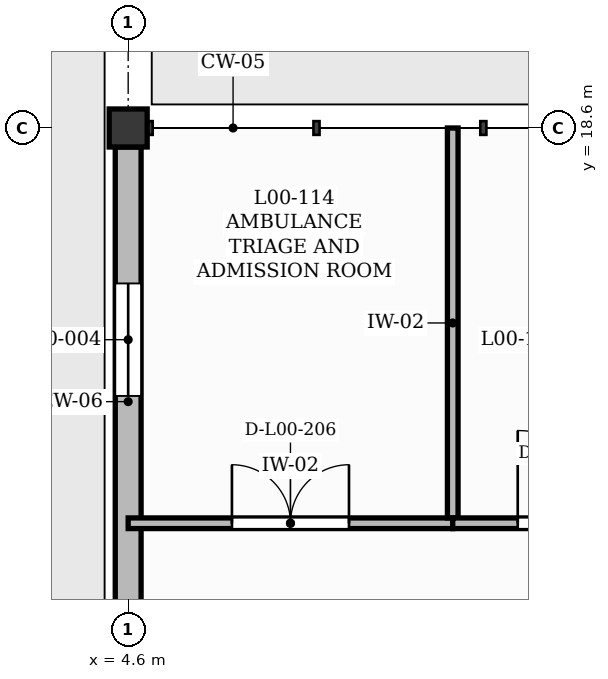
"""IFC4 building model, lengths in metres.
Left out: names, types, materials, properties, quantities, classifications, styles, units other than length and angle.
Written with IfcOpenShell. Run it as: python <this file> out.ifc"""

import sys

from ifc_helpers import new_model, si_unit, direction, frame, frame_2d, origin, origin_2d, place, context, subcontext, project, spatial, rectangle, extrude, element, fill, save


model = new_model("IFC4")
c1 = context("Model", 3, precision=1e-05, world=origin(), true_north=direction((0.0, 1.0)))
c2 = subcontext(c1, "Body", "Model", "MODEL_VIEW")
j1 = project(units=[si_unit("LENGTHUNIT", "METRE"), si_unit("PLANEANGLEUNIT", "RADIAN")], contexts=[c1])
p1 = place(None, origin())
s1 = spatial("IfcSite", under=j1, at=p1, CompositionType="ELEMENT")
p2 = place(p1, origin())
s2 = spatial("IfcBuilding", under=s1, at=p2, CompositionType="ELEMENT")
p3 = place(p2, origin())
s3 = spatial("IfcBuildingStorey", under=s2, at=p3, CompositionType="ELEMENT", Elevation=0.0)
p4 = place(p3, frame((4.6, 18.6, 0.0), z_axis=(0.0, 0.0, 1.0), x_axis=(1.0, 0.0, 0.0)))
e1 = element("IfcColumn", 1, at=p4, inside=s3, PredefinedType="COLUMN", context=c2, shape_type="SweptSolid", body=[
    extrude(rectangle(XDim=0.5, YDim=0.5, at=origin_2d()), origin(), (0.0, 0.0, 1.0), 4.2),
])
p5 = place(p3, frame((4.6, 11.65, 0.0), z_axis=(0.0, 0.0, 1.0), x_axis=(0.0, 1.0, 0.0)))
e2 = element("IfcWall", 2, at=p5, inside=s3, PredefinedType="SOLIDWALL", context=c2, shape_type="SweptSolid", body=[
    extrude(rectangle(XDim=6.7, YDim=0.34, at=frame_2d((3.35, 0.0))), origin(), (0.0, 0.0, 1.0), 3.68),
])
p6 = place(p5, frame((3.425, 0.0, 1.0)))
e3 = element("IfcOpeningElement", 3, at=p6, cuts=e2, PredefinedType="OPENING", context=c2, shape_type="SweptSolid", body=[
    extrude(rectangle(XDim=1.48, YDim=2.2, at=frame_2d((0.74, 1.1))), frame((0.0, 0.18, 0.0), z_axis=(0.0, -1.0, 0.0), x_axis=(1.0, 0.0, 0.0)), (0.0, 0.0, 1.0), 0.36),
])
p7 = place(p3, frame((4.6, 13.4, 0.0), z_axis=(0.0, 0.0, 1.0), x_axis=(1.0, 0.0, 0.0)))
e4 = element("IfcWall", 4, at=p7, inside=s3, PredefinedType="PARTITIONING", context=c2, shape_type="SweptSolid", body=[
    extrude(rectangle(XDim=4.27, YDim=0.14, at=frame_2d((2.135, 0.0))), origin(), (0.0, 0.0, 1.0), 4.18),
])
p8 = place(p7, frame((1.365, 0.0, 0.0)))
e5 = element("IfcOpeningElement", 5, at=p8, cuts=e4, PredefinedType="OPENING", context=c2, shape_type="SweptSolid", body=[
    extrude(rectangle(XDim=1.54, YDim=2.25, at=frame_2d((0.77, 1.125))), frame((0.0, 0.08, 0.0), z_axis=(0.0, -1.0, 0.0), x_axis=(1.0, 0.0, 0.0)), (0.0, 0.0, 1.0), 0.16),
])
p9 = place(p3, frame((8.87, 13.47, 0.0), z_axis=(0.0, 0.0, 1.0), x_axis=(0.0, 1.0, 0.0)))
e6 = element("IfcWall", 6, at=p9, inside=s3, PredefinedType="PARTITIONING", context=c2, shape_type="SweptSolid", body=[
    extrude(rectangle(XDim=5.13, YDim=0.14, at=frame_2d((2.565, 0.0))), origin(), (0.0, 0.0, 1.0), 4.18),
])
p10 = place(p3, frame((8.87, 13.4, 0.0), z_axis=(0.0, 0.0, 1.0), x_axis=(1.0, 0.0, 0.0)))
e7 = element("IfcWall", 7, at=p10, inside=s3, PredefinedType="PARTITIONING", context=c2, shape_type="SweptSolid", body=[
    extrude(rectangle(XDim=2.93, YDim=0.14, at=frame_2d((1.465, 0.0))), origin(), (0.0, 0.0, 1.0), 4.18),
])
p11 = place(p10, frame((0.855, 0.0, 0.0)))
e8 = element("IfcOpeningElement", 8, at=p11, cuts=e7, PredefinedType="OPENING", context=c2, shape_type="SweptSolid", body=[
    extrude(rectangle(XDim=1.22, YDim=2.1, at=frame_2d((0.61, 1.05))), frame((0.0, 0.08, 0.0), z_axis=(0.0, -1.0, 0.0), x_axis=(1.0, 0.0, 0.0)), (0.0, 0.0, 1.0), 0.16),
])
p12 = place(p6, origin())
e9 = element("IfcWindow", 9, at=p12, inside=s3, PartitioningType="SINGLE_PANEL", PredefinedType="WINDOW", context=c2, shape_type="SweptSolid", body=[
    extrude(rectangle(XDim=1.48, YDim=2.2, at=frame_2d((0.74, 1.1))), frame((0.0, 0.03, 0.0), z_axis=(0.0, -1.0, 0.0), x_axis=(1.0, 0.0, 0.0)), (0.0, 0.0, 1.0), 0.06),
])
fill(e3, e9)
p13 = place(p8, origin())
e10 = element("IfcDoor", 10, at=p13, inside=s3, OperationType="DOUBLE_DOOR_SINGLE_SWING", PredefinedType="DOOR", context=c2, shape_type="SweptSolid", body=[
    extrude(rectangle(XDim=1.54, YDim=2.25, at=frame_2d((0.77, 1.125))), frame((0.0, 0.025, 0.0), z_axis=(0.0, -1.0, 0.0), x_axis=(1.0, 0.0, 0.0)), (0.0, 0.0, 1.0), 0.05),
])
fill(e5, e10)
p14 = place(p11, origin())
e11 = element("IfcDoor", 11, at=p14, inside=s3, OperationType="SINGLE_SWING_LEFT", PredefinedType="DOOR", context=c2, shape_type="SweptSolid", body=[
    extrude(rectangle(XDim=1.22, YDim=2.1, at=frame_2d((0.61, 1.05))), frame((0.0, 0.025, 0.0), z_axis=(0.0, -1.0, 0.0), x_axis=(1.0, 0.0, 0.0)), (0.0, 0.0, 1.0), 0.05),
])
fill(e8, e11)
save(model, sys.argv[1])
